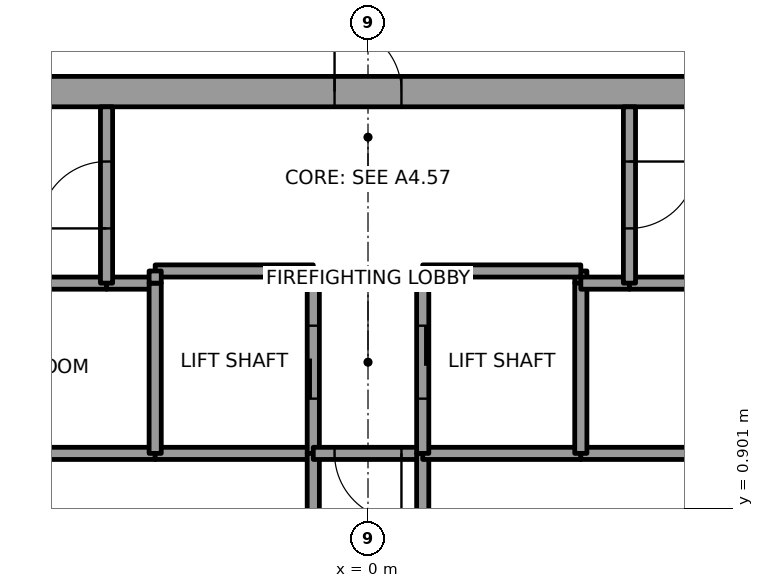
"""IFC4 building model, lengths in metres.
Left out: names, types, materials, properties, quantities, classifications, styles, units other than length and angle.
Written with IfcOpenShell. Run it as: python <this file> out.ifc"""

import sys

from ifc_helpers import new_model, si_unit, direction, frame, frame_2d, origin, place, context, subcontext, project, spatial, rectangle, extrude, element, fill, save


model = new_model("IFC4")
c1 = context("Model", 3, precision=1e-05, world=origin(), true_north=direction((0.0, 1.0)))
c2 = subcontext(c1, "Body", "Model", "MODEL_VIEW")
j1 = project(units=[si_unit("LENGTHUNIT", "METRE"), si_unit("PLANEANGLEUNIT", "RADIAN")], contexts=[c1])
p1 = place(None, origin())
s1 = spatial("IfcSite", under=j1, at=p1, CompositionType="ELEMENT")
p2 = place(p1, origin())
s2 = spatial("IfcBuilding", under=s1, at=p2, CompositionType="ELEMENT")
p3 = place(p2, frame((0.0, 0.0, 247.0)))
s3 = spatial("IfcBuildingStorey", under=s2, at=p3, CompositionType="ELEMENT", Elevation=247.0)
p4 = place(p3, frame((-11.0, 7.75, 0.0), z_axis=(0.0, 0.0, 1.0), x_axis=(1.0, 0.0, 0.0)))
e1 = element("IfcWall", 1, at=p4, inside=s3, PredefinedType="SHEAR", context=c2, shape_type="SweptSolid", body=[
    extrude(rectangle(XDim=22.0, YDim=0.5, at=frame_2d((11.0, 0.0))), origin(), (0.0, 0.0, 1.0), 4.0),
])
p5 = place(p4, frame((10.45, 0.0, 0.0)))
e2 = element("IfcOpeningElement", 2, at=p5, cuts=e1, PredefinedType="OPENING", context=c2, shape_type="SweptSolid", body=[
    extrude(rectangle(XDim=1.1, YDim=2.1, at=frame_2d((0.55, 1.05))), frame((0.0, 0.25, 0.0), z_axis=(0.0, -1.0, 0.0), x_axis=(1.0, 0.0, 0.0)), (0.0, 0.0, 1.0), 0.5),
])
p6 = place(p3, frame((-8.7, 1.8, 0.0), z_axis=(0.0, 0.0, 1.0), x_axis=(1.0, 0.0, 0.0)))
e3 = element("IfcWall", 3, at=p6, inside=s3, PredefinedType="SOLIDWALL", context=c2, shape_type="SweptSolid", body=[
    extrude(rectangle(XDim=5.2, YDim=0.2, at=frame_2d((2.6, 0.0))), origin(), (0.0, 0.0, 1.0), 3.85),
])
p7 = place(p6, frame((2.15, 0.0, 0.0)))
e4 = element("IfcOpeningElement", 4, at=p7, cuts=e3, PredefinedType="OPENING", context=c2, shape_type="SweptSolid", body=[
    extrude(rectangle(XDim=0.9, YDim=2.1, at=frame_2d((0.45, 1.05))), frame((0.0, 0.1, 0.0), z_axis=(0.0, -1.0, 0.0), x_axis=(1.0, 0.0, 0.0)), (0.0, 0.0, 1.0), 0.2),
])
p8 = place(p3, frame((-4.3, 4.6, 0.0), z_axis=(0.0, 0.0, 1.0), x_axis=(-1.0, 0.0, 0.0)))
e5 = element("IfcWall", 5, at=p8, inside=s3, PredefinedType="SOLIDWALL", context=c2, shape_type="SweptSolid", body=[
    extrude(rectangle(XDim=4.4, YDim=0.2, at=frame_2d((2.2, 0.0))), origin(), (0.0, 0.0, 1.0), 3.85),
])
p9 = place(p3, frame((-3.5, 4.6, 0.0), z_axis=(0.0, 0.0, 1.0), x_axis=(-1.0, 0.0, 0.0)))
e6 = element("IfcWall", 6, at=p9, inside=s3, PredefinedType="SOLIDWALL", context=c2, shape_type="SweptSolid", body=[
    extrude(rectangle(XDim=0.8, YDim=0.2, at=frame_2d((0.4, 0.0))), origin(), (0.0, 0.0, 1.0), 3.85),
])
p10 = place(p3, frame((-4.3, 4.6, 0.0), z_axis=(0.0, 0.0, 1.0), x_axis=(0.0, 1.0, 0.0)))
e7 = element("IfcWall", 7, at=p10, inside=s3, PredefinedType="SOLIDWALL", context=c2, shape_type="SweptSolid", body=[
    extrude(rectangle(XDim=2.9, YDim=0.2, at=frame_2d((1.45, 0.0))), origin(), (0.0, 0.0, 1.0), 3.85),
])
p11 = place(p10, frame((0.9, 0.0, 0.0)))
e8 = element("IfcOpeningElement", 8, at=p11, cuts=e7, PredefinedType="OPENING", context=c2, shape_type="SweptSolid", body=[
    extrude(rectangle(XDim=1.1, YDim=2.1, at=frame_2d((0.55, 1.05))), frame((0.0, 0.1, 0.0), z_axis=(0.0, -1.0, 0.0), x_axis=(1.0, 0.0, 0.0)), (0.0, 0.0, 1.0), 0.2),
])
p12 = place(p3, frame((-0.9, 1.8, 0.0), z_axis=(0.0, 0.0, 1.0), x_axis=(-1.0, 0.0, 0.0)))
e9 = element("IfcWall", 9, at=p12, inside=s3, PredefinedType="SOLIDWALL", context=c2, shape_type="SweptSolid", body=[
    extrude(rectangle(XDim=2.6, YDim=0.2, at=frame_2d((1.3, 0.0))), origin(), (0.0, 0.0, 1.0), 3.85),
])
p13 = place(p3, frame((-3.5, 1.8, 0.0), z_axis=(0.0, 0.0, 1.0), x_axis=(0.0, 1.0, 0.0)))
e10 = element("IfcWall", 10, at=p13, inside=s3, PredefinedType="SOLIDWALL", context=c2, shape_type="SweptSolid", body=[
    extrude(rectangle(XDim=2.8, YDim=0.2, at=frame_2d((1.4, 0.0))), origin(), (0.0, 0.0, 1.0), 3.85),
])
p14 = place(p3, frame((-0.9, 1.8, 0.0), z_axis=(0.0, 0.0, 1.0), x_axis=(0.0, 1.0, 0.0)))
e11 = element("IfcWall", 11, at=p14, inside=s3, PredefinedType="SOLIDWALL", context=c2, shape_type="SweptSolid", body=[
    extrude(rectangle(XDim=3.0, YDim=0.2, at=frame_2d((1.5, 0.0))), origin(), (0.0, 0.0, 1.0), 3.85),
])
p15 = place(p14, frame((0.9, 0.0, 0.0)))
e12 = element("IfcOpeningElement", 12, at=p15, cuts=e11, PredefinedType="OPENING", context=c2, shape_type="SweptSolid", body=[
    extrude(rectangle(XDim=1.2, YDim=2.1, at=frame_2d((0.6, 1.05))), frame((0.0, 0.1, 0.0), z_axis=(0.0, -1.0, 0.0), x_axis=(1.0, 0.0, 0.0)), (0.0, 0.0, 1.0), 0.2),
])
p16 = place(p3, frame((-0.9, 4.8, 0.0), z_axis=(0.0, 0.0, 1.0), x_axis=(-1.0, 0.0, 0.0)))
e13 = element("IfcWall", 13, at=p16, inside=s3, PredefinedType="SOLIDWALL", context=c2, shape_type="SweptSolid", body=[
    extrude(rectangle(XDim=2.6, YDim=0.2, at=frame_2d((1.3, 0.0))), origin(), (0.0, 0.0, 1.0), 3.85),
])
p17 = place(p3, frame((-3.5, 4.8, 0.0), z_axis=(0.0, 0.0, 1.0), x_axis=(0.0, -1.0, 0.0)))
e14 = element("IfcWall", 14, at=p17, inside=s3, PredefinedType="SOLIDWALL", context=c2, shape_type="SweptSolid", body=[
    extrude(rectangle(XDim=0.2, YDim=0.2, at=frame_2d((0.1, 0.0))), origin(), (0.0, 0.0, 1.0), 3.85),
])
p18 = place(p3, frame((-0.9, 1.8, 0.0), z_axis=(0.0, 0.0, 1.0), x_axis=(0.0, -1.0, 0.0)))
e15 = element("IfcWall", 15, at=p18, inside=s3, PredefinedType="SOLIDWALL", context=c2, shape_type="SweptSolid", body=[
    extrude(rectangle(XDim=3.6, YDim=0.2, at=frame_2d((1.8, 0.0))), origin(), (0.0, 0.0, 1.0), 3.85),
])
p19 = place(p18, frame((1.05, 0.0, 0.0)))
e16 = element("IfcOpeningElement", 16, at=p19, cuts=e15, PredefinedType="OPENING", context=c2, shape_type="SweptSolid", body=[
    extrude(rectangle(XDim=1.5, YDim=2.1, at=frame_2d((0.75, 1.05))), frame((0.0, 0.1, 0.0), z_axis=(0.0, -1.0, 0.0), x_axis=(1.0, 0.0, 0.0)), (0.0, 0.0, 1.0), 0.2),
])
p20 = place(p3, frame((0.9, 1.8, 0.0), z_axis=(0.0, 0.0, 1.0), x_axis=(-1.0, 0.0, 0.0)))
e17 = element("IfcWall", 17, at=p20, inside=s3, PredefinedType="SOLIDWALL", context=c2, shape_type="SweptSolid", body=[
    extrude(rectangle(XDim=1.8, YDim=0.2, at=frame_2d((0.9, 0.0))), origin(), (0.0, 0.0, 1.0), 3.85),
])
p21 = place(p20, frame((0.35, 0.0, 0.0)))
e18 = element("IfcOpeningElement", 18, at=p21, cuts=e17, PredefinedType="OPENING", context=c2, shape_type="SweptSolid", body=[
    extrude(rectangle(XDim=1.1, YDim=2.1, at=frame_2d((0.55, 1.05))), frame((0.0, 0.1, 0.0), z_axis=(0.0, -1.0, 0.0), x_axis=(1.0, 0.0, 0.0)), (0.0, 0.0, 1.0), 0.2),
])
p22 = place(p3, frame((0.9, -1.8, 0.0), z_axis=(0.0, 0.0, 1.0), x_axis=(0.0, 1.0, 0.0)))
e19 = element("IfcWall", 19, at=p22, inside=s3, PredefinedType="SOLIDWALL", context=c2, shape_type="SweptSolid", body=[
    extrude(rectangle(XDim=3.6, YDim=0.2, at=frame_2d((1.8, 0.0))), origin(), (0.0, 0.0, 1.0), 3.85),
])
p23 = place(p22, frame((1.05, 0.0, 0.0)))
e20 = element("IfcOpeningElement", 20, at=p23, cuts=e19, PredefinedType="OPENING", context=c2, shape_type="SweptSolid", body=[
    extrude(rectangle(XDim=1.5, YDim=2.1, at=frame_2d((0.75, 1.05))), frame((0.0, 0.1, 0.0), z_axis=(0.0, -1.0, 0.0), x_axis=(1.0, 0.0, 0.0)), (0.0, 0.0, 1.0), 0.2),
])
p24 = place(p3, frame((3.5, 1.8, 0.0), z_axis=(0.0, 0.0, 1.0), x_axis=(-1.0, 0.0, 0.0)))
e21 = element("IfcWall", 21, at=p24, inside=s3, PredefinedType="SOLIDWALL", context=c2, shape_type="SweptSolid", body=[
    extrude(rectangle(XDim=2.6, YDim=0.2, at=frame_2d((1.3, 0.0))), origin(), (0.0, 0.0, 1.0), 3.85),
])
p25 = place(p3, frame((3.5, 4.6, 0.0), z_axis=(0.0, 0.0, 1.0), x_axis=(0.0, 1.0, 0.0)))
e22 = element("IfcWall", 22, at=p25, inside=s3, PredefinedType="SOLIDWALL", context=c2, shape_type="SweptSolid", body=[
    extrude(rectangle(XDim=0.2, YDim=0.2, at=frame_2d((0.1, 0.0))), origin(), (0.0, 0.0, 1.0), 3.85),
])
p26 = place(p3, frame((3.5, 4.8, 0.0), z_axis=(0.0, 0.0, 1.0), x_axis=(-1.0, 0.0, 0.0)))
e23 = element("IfcWall", 23, at=p26, inside=s3, PredefinedType="SOLIDWALL", context=c2, shape_type="SweptSolid", body=[
    extrude(rectangle(XDim=2.6, YDim=0.2, at=frame_2d((1.3, 0.0))), origin(), (0.0, 0.0, 1.0), 3.85),
])
p27 = place(p3, frame((0.9, 4.8, 0.0), z_axis=(0.0, 0.0, 1.0), x_axis=(0.0, -1.0, 0.0)))
e24 = element("IfcWall", 24, at=p27, inside=s3, PredefinedType="SOLIDWALL", context=c2, shape_type="SweptSolid", body=[
    extrude(rectangle(XDim=3.0, YDim=0.2, at=frame_2d((1.5, 0.0))), origin(), (0.0, 0.0, 1.0), 3.85),
])
p28 = place(p27, frame((0.9, 0.0, 0.0)))
e25 = element("IfcOpeningElement", 25, at=p28, cuts=e24, PredefinedType="OPENING", context=c2, shape_type="SweptSolid", body=[
    extrude(rectangle(XDim=1.2, YDim=2.1, at=frame_2d((0.6, 1.05))), frame((0.0, 0.1, 0.0), z_axis=(0.0, -1.0, 0.0), x_axis=(1.0, 0.0, 0.0)), (0.0, 0.0, 1.0), 0.2),
])
p29 = place(p3, frame((3.5, 1.8, 0.0), z_axis=(0.0, 0.0, 1.0), x_axis=(1.0, 0.0, 0.0)))
e26 = element("IfcWall", 26, at=p29, inside=s3, PredefinedType="SOLIDWALL", context=c2, shape_type="SweptSolid", body=[
    extrude(rectangle(XDim=5.2, YDim=0.2, at=frame_2d((2.6, 0.0))), origin(), (0.0, 0.0, 1.0), 3.85),
])
p30 = place(p29, frame((2.15, 0.0, 0.0)))
e27 = element("IfcOpeningElement", 27, at=p30, cuts=e26, PredefinedType="OPENING", context=c2, shape_type="SweptSolid", body=[
    extrude(rectangle(XDim=0.9, YDim=2.1, at=frame_2d((0.45, 1.05))), frame((0.0, 0.1, 0.0), z_axis=(0.0, -1.0, 0.0), x_axis=(1.0, 0.0, 0.0)), (0.0, 0.0, 1.0), 0.2),
])
p31 = place(p3, frame((3.5, 4.6, 0.0), z_axis=(0.0, 0.0, 1.0), x_axis=(0.0, -1.0, 0.0)))
e28 = element("IfcWall", 28, at=p31, inside=s3, PredefinedType="SOLIDWALL", context=c2, shape_type="SweptSolid", body=[
    extrude(rectangle(XDim=2.8, YDim=0.2, at=frame_2d((1.4, 0.0))), origin(), (0.0, 0.0, 1.0), 3.85),
])
p32 = place(p3, frame((4.3, 4.6, 0.0), z_axis=(0.0, 0.0, 1.0), x_axis=(-1.0, 0.0, 0.0)))
e29 = element("IfcWall", 29, at=p32, inside=s3, PredefinedType="SOLIDWALL", context=c2, shape_type="SweptSolid", body=[
    extrude(rectangle(XDim=0.8, YDim=0.2, at=frame_2d((0.4, 0.0))), origin(), (0.0, 0.0, 1.0), 3.85),
])
p33 = place(p3, frame((8.7, 4.6, 0.0), z_axis=(0.0, 0.0, 1.0), x_axis=(-1.0, 0.0, 0.0)))
e30 = element("IfcWall", 30, at=p33, inside=s3, PredefinedType="SOLIDWALL", context=c2, shape_type="SweptSolid", body=[
    extrude(rectangle(XDim=4.4, YDim=0.2, at=frame_2d((2.2, 0.0))), origin(), (0.0, 0.0, 1.0), 3.85),
])
p34 = place(p3, frame((4.3, 7.5, 0.0), z_axis=(0.0, 0.0, 1.0), x_axis=(0.0, -1.0, 0.0)))
e31 = element("IfcWall", 31, at=p34, inside=s3, PredefinedType="SOLIDWALL", context=c2, shape_type="SweptSolid", body=[
    extrude(rectangle(XDim=2.9, YDim=0.2, at=frame_2d((1.45, 0.0))), origin(), (0.0, 0.0, 1.0), 3.85),
])
p35 = place(p34, frame((0.9, 0.0, 0.0)))
e32 = element("IfcOpeningElement", 32, at=p35, cuts=e31, PredefinedType="OPENING", context=c2, shape_type="SweptSolid", body=[
    extrude(rectangle(XDim=1.1, YDim=2.1, at=frame_2d((0.55, 1.05))), frame((0.0, 0.1, 0.0), z_axis=(0.0, -1.0, 0.0), x_axis=(1.0, 0.0, 0.0)), (0.0, 0.0, 1.0), 0.2),
])
p36 = place(p15, origin())
e33 = element("IfcDoor", 33, at=p36, inside=s3, OperationType="SLIDING_TO_RIGHT", PredefinedType="DOOR", context=c2, shape_type="SweptSolid", body=[
    extrude(rectangle(XDim=1.2, YDim=2.1, at=frame_2d((0.6, 1.05))), frame((0.0, 0.025, 0.0), z_axis=(0.0, -1.0, 0.0), x_axis=(1.0, 0.0, 0.0)), (0.0, 0.0, 1.0), 0.05),
])
fill(e12, e33)
p37 = place(p28, origin())
e34 = element("IfcDoor", 34, at=p37, inside=s3, OperationType="SLIDING_TO_LEFT", PredefinedType="DOOR", context=c2, shape_type="SweptSolid", body=[
    extrude(rectangle(XDim=1.2, YDim=2.1, at=frame_2d((0.6, 1.05))), frame((0.0, 0.025, 0.0), z_axis=(0.0, -1.0, 0.0), x_axis=(1.0, 0.0, 0.0)), (0.0, 0.0, 1.0), 0.05),
])
fill(e25, e34)
p38 = place(p21, origin())
e35 = element("IfcDoor", 35, at=p38, inside=s3, OperationType="SINGLE_SWING_RIGHT", PredefinedType="DOOR", context=c2, shape_type="SweptSolid", body=[
    extrude(rectangle(XDim=1.1, YDim=2.1, at=frame_2d((0.55, 1.05))), frame((0.0, 0.025, 0.0), z_axis=(0.0, -1.0, 0.0), x_axis=(1.0, 0.0, 0.0)), (0.0, 0.0, 1.0), 0.05),
])
fill(e18, e35)
p39 = place(p11, origin())
e36 = element("IfcDoor", 36, at=p39, inside=s3, OperationType="SINGLE_SWING_RIGHT", PredefinedType="DOOR", context=c2, shape_type="SweptSolid", body=[
    extrude(rectangle(XDim=1.1, YDim=2.1, at=frame_2d((0.55, 1.05))), frame((0.0, 0.025, 0.0), z_axis=(0.0, -1.0, 0.0), x_axis=(1.0, 0.0, 0.0)), (0.0, 0.0, 1.0), 0.05),
])
fill(e8, e36)
p40 = place(p35, origin())
e37 = element("IfcDoor", 37, at=p40, inside=s3, OperationType="SINGLE_SWING_RIGHT", PredefinedType="DOOR", context=c2, shape_type="SweptSolid", body=[
    extrude(rectangle(XDim=1.1, YDim=2.1, at=frame_2d((0.55, 1.05))), frame((0.0, 0.025, 0.0), z_axis=(0.0, -1.0, 0.0), x_axis=(1.0, 0.0, 0.0)), (0.0, 0.0, 1.0), 0.05),
])
fill(e32, e37)
p41 = place(p5, origin())
e38 = element("IfcDoor", 38, at=p41, inside=s3, OperationType="SINGLE_SWING_RIGHT", PredefinedType="DOOR", context=c2, shape_type="SweptSolid", body=[
    extrude(rectangle(XDim=1.1, YDim=2.1, at=frame_2d((0.55, 1.05))), frame((0.0, 0.025, 0.0), z_axis=(0.0, -1.0, 0.0), x_axis=(1.0, 0.0, 0.0)), (0.0, 0.0, 1.0), 0.05),
])
fill(e2, e38)
save(model, sys.argv[1])
